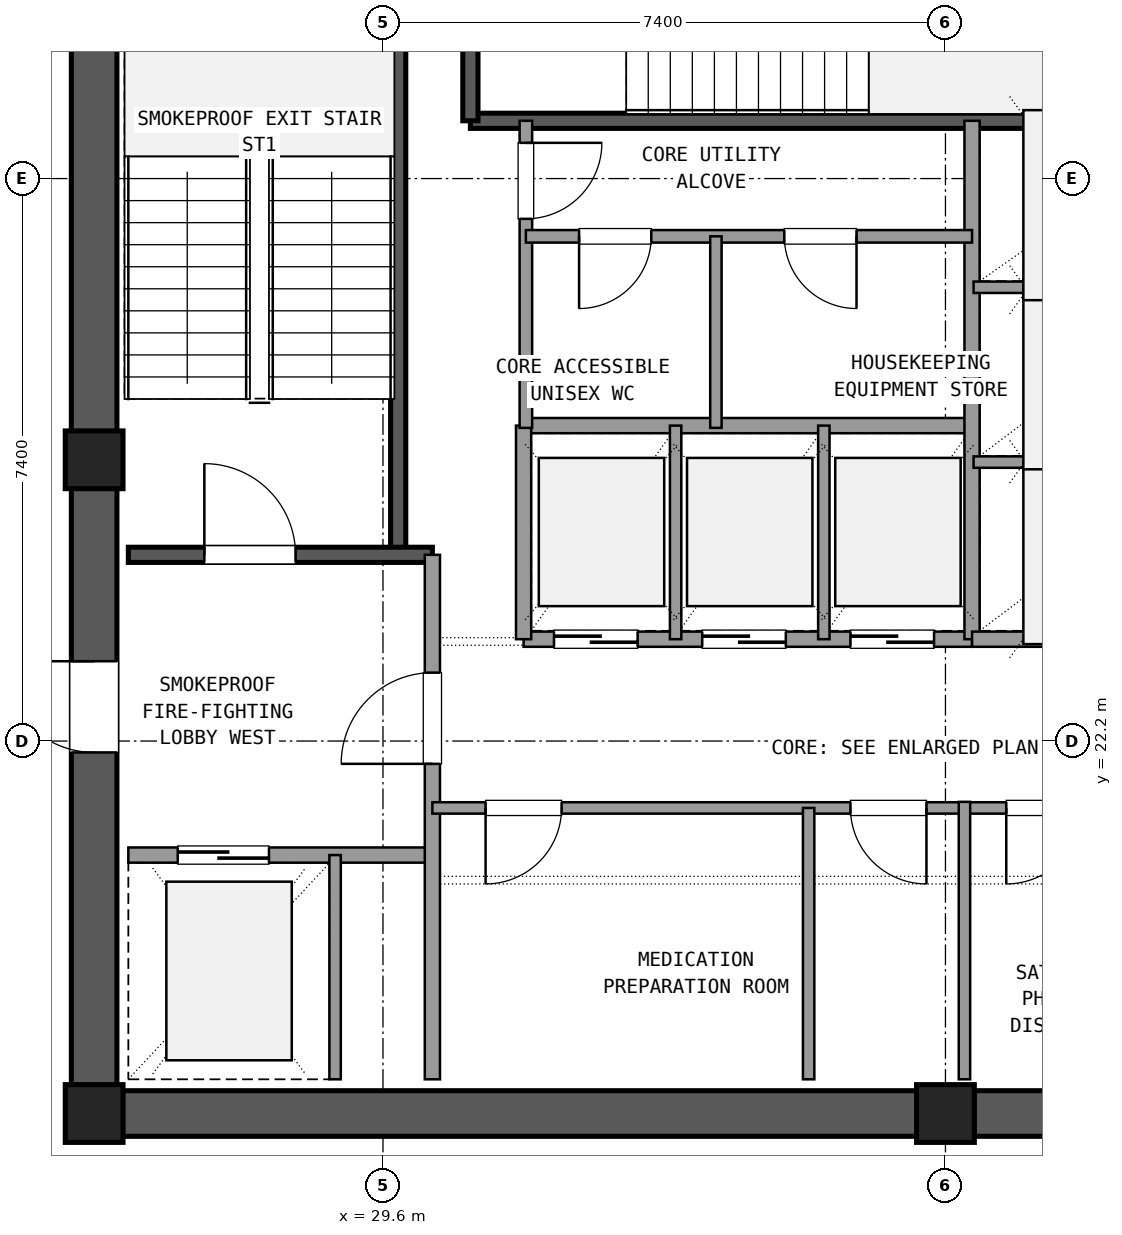
"""IFC4 building model, lengths in metres.
Left out: names, types, materials, properties, quantities, classifications, styles, units other than length and angle.
Written with IfcOpenShell. Run it as: python <this file> out.ifc"""

import sys

from ifc_helpers import new_model, si_unit, direction, frame, frame_2d, origin, origin_2d, place, context, subcontext, project, spatial, rectangle, extrude, element, fill, save


model = new_model("IFC4")
c1 = context("Model", 3, precision=1e-05, world=origin(), true_north=direction((0.0, 1.0)))
c2 = subcontext(c1, "Body", "Model", "MODEL_VIEW")
j1 = project(units=[si_unit("LENGTHUNIT", "METRE"), si_unit("PLANEANGLEUNIT", "RADIAN")], contexts=[c1])
p1 = place(None, origin())
s1 = spatial("IfcSite", under=j1, at=p1, CompositionType="ELEMENT")
p2 = place(p1, origin())
s2 = spatial("IfcBuilding", under=s1, at=p2, CompositionType="ELEMENT")
p3 = place(p2, frame((0.0, 0.0, 290.34)))
s3 = spatial("IfcBuildingStorey", under=s2, at=p3, CompositionType="ELEMENT", Elevation=290.34)
for number, where, z_axis, x_axis in (
    (1, (25.8, 17.3, 0.0), (0.0, 0.0, 1.0), (1.0, 0.0, 0.0)),
    (2, (37.0, 17.3, 0.0), (0.0, 0.0, 1.0), (1.0, 0.0, 0.0)),
    (3, (25.8, 25.9, 0.0), (0.0, 0.0, 1.0), (1.0, 0.0, 0.0)),
):
    element("IfcColumn", number, at=place(p3, frame(where, z_axis=z_axis, x_axis=x_axis)), inside=s3, PredefinedType="COLUMN", context=c2, shape_type="SweptSolid", body=[
        extrude(rectangle(XDim=0.76, YDim=0.76, at=origin_2d()), origin(), (0.0, 0.0, 1.0), 4.32),
    ])
for number, where, z_axis, x_axis in (
    (4, (26.175, 17.3, 0.0), (0.0, 0.0, 1.0), (1.0, 0.0, 0.0)),
    (5, (37.375, 17.3, 0.0), (0.0, 0.0, 1.0), (1.0, 0.0, 0.0)),
):
    element("IfcWall", number, at=place(p3, frame(where, z_axis=z_axis, x_axis=x_axis)), inside=s3, PredefinedType="SHEAR", context=c2, shape_type="SweptSolid", body=[
        extrude(rectangle(XDim=10.45, YDim=0.6, at=frame_2d((5.225, 0.0))), origin(), (0.0, 0.0, 1.0), 4.02),
    ])
p4 = place(p3, frame((25.8, 34.125, 0.0), z_axis=(0.0, 0.0, 1.0), x_axis=(0.0, -1.0, 0.0)))
e6 = element("IfcWall", 6, at=p4, inside=s3, PredefinedType="SHEAR", context=c2, shape_type="SweptSolid", body=[
    extrude(rectangle(XDim=7.85, YDim=0.6, at=frame_2d((3.925, 0.0))), origin(), (0.0, 0.0, 1.0), 4.02),
])
p5 = place(p3, frame((25.8, 25.525, 0.0), z_axis=(0.0, 0.0, 1.0), x_axis=(0.0, -1.0, 0.0)))
e7 = element("IfcWall", 7, at=p5, inside=s3, PredefinedType="SHEAR", context=c2, shape_type="SweptSolid", body=[
    extrude(rectangle(XDim=7.85, YDim=0.6, at=frame_2d((3.925, 0.0))), origin(), (0.0, 0.0, 1.0), 4.02),
])
p6 = place(p5, frame((2.275, 0.0, 0.0)))
e8 = element("IfcOpeningElement", 8, at=p6, cuts=e7, PredefinedType="OPENING", context=c2, shape_type="SweptSolid", body=[
    extrude(rectangle(XDim=1.2, YDim=2.15, at=frame_2d((0.6, 1.075))), frame((0.0, 0.31, 0.0), z_axis=(0.0, -1.0, 0.0), x_axis=(1.0, 0.0, 0.0)), (0.0, 0.0, 1.0), 0.62),
])
p7 = place(p3, frame((29.8, 24.65, 0.0), z_axis=(0.0, 0.0, 1.0), x_axis=(0.0, 1.0, 0.0)))
e9 = element("IfcWall", 9, at=p7, inside=s3, PredefinedType="SHEAR", context=c2, shape_type="SweptSolid", body=[
    extrude(rectangle(XDim=9.4, YDim=0.2, at=frame_2d((4.7, 0.0))), origin(), (0.0, 0.0, 1.0), 4.02),
])
p8 = place(p3, frame((26.25, 24.65, 0.0), z_axis=(0.0, 0.0, 1.0), x_axis=(1.0, 0.0, 0.0)))
e10 = element("IfcWall", 10, at=p8, inside=s3, PredefinedType="SHEAR", context=c2, shape_type="SweptSolid", body=[
    extrude(rectangle(XDim=4.0, YDim=0.2, at=frame_2d((2.0, 0.0))), origin(), (0.0, 0.0, 1.0), 4.02),
])
p9 = place(p8, frame((1.0, 0.0, 0.0)))
e11 = element("IfcOpeningElement", 11, at=p9, cuts=e10, PredefinedType="OPENING", context=c2, shape_type="SweptSolid", body=[
    extrude(rectangle(XDim=1.2, YDim=2.15, at=frame_2d((0.6, 1.075))), frame((0.0, 0.11, 0.0), z_axis=(0.0, -1.0, 0.0), x_axis=(1.0, 0.0, 0.0)), (0.0, 0.0, 1.0), 0.22),
])
p10 = place(p3, frame((30.75, 30.36, 0.0), z_axis=(0.0, 0.0, 1.0), x_axis=(1.0, 0.0, 0.0)))
e12 = element("IfcWall", 12, at=p10, inside=s3, PredefinedType="SHEAR", context=c2, shape_type="SweptSolid", body=[
    extrude(rectangle(XDim=9.5, YDim=0.2, at=frame_2d((4.75, 0.0))), origin(), (0.0, 0.0, 1.0), 4.02),
])
p11 = place(p3, frame((30.75, 30.36, 0.0), z_axis=(0.0, 0.0, 1.0), x_axis=(0.0, 1.0, 0.0)))
e13 = element("IfcWall", 13, at=p11, inside=s3, PredefinedType="SHEAR", context=c2, shape_type="SweptSolid", body=[
    extrude(rectangle(XDim=3.69, YDim=0.2, at=frame_2d((1.845, 0.0))), origin(), (0.0, 0.0, 1.0), 4.02),
])
p12 = place(p3, frame((26.25, 20.7, 0.0), z_axis=(0.0, 0.0, 1.0), x_axis=(1.0, 0.0, 0.0)))
e14 = element("IfcWall", 14, at=p12, inside=s3, PredefinedType="SOLIDWALL", context=c2, shape_type="SweptSolid", body=[
    extrude(rectangle(XDim=4.0, YDim=0.2, at=frame_2d((2.0, 0.0))), origin(), (0.0, 0.0, 1.0), 2.93),
])
p13 = place(p12, frame((0.65, 0.0, 0.0)))
e15 = element("IfcOpeningElement", 15, at=p13, cuts=e14, PredefinedType="OPENING", context=c2, shape_type="SweptSolid", body=[
    extrude(rectangle(XDim=1.2, YDim=2.15, at=frame_2d((0.6, 1.075))), frame((0.0, 0.11, 0.0), z_axis=(0.0, -1.0, 0.0), x_axis=(1.0, 0.0, 0.0)), (0.0, 0.0, 1.0), 0.22),
])
p14 = place(p3, frame((30.25, 17.75, 0.0), z_axis=(0.0, 0.0, 1.0), x_axis=(0.0, 1.0, 0.0)))
e16 = element("IfcWall", 16, at=p14, inside=s3, PredefinedType="SOLIDWALL", context=c2, shape_type="SweptSolid", body=[
    extrude(rectangle(XDim=6.9, YDim=0.2, at=frame_2d((3.45, 0.0))), origin(), (0.0, 0.0, 1.0), 2.93),
])
p15 = place(p14, frame((4.15, 0.0, 0.0)))
e17 = element("IfcOpeningElement", 17, at=p15, cuts=e16, PredefinedType="OPENING", context=c2, shape_type="SweptSolid", body=[
    extrude(rectangle(XDim=1.2, YDim=2.15, at=frame_2d((0.6, 1.075))), frame((0.0, 0.11, 0.0), z_axis=(0.0, -1.0, 0.0), x_axis=(1.0, 0.0, 0.0)), (0.0, 0.0, 1.0), 0.22),
])
p16 = place(p3, frame((28.97, 17.75, 0.0), z_axis=(0.0, 0.0, 1.0), x_axis=(0.0, 1.0, 0.0)))
e18 = element("IfcWall", 18, at=p16, inside=s3, PredefinedType="PARTITIONING", context=c2, shape_type="SweptSolid", body=[
    extrude(rectangle(XDim=2.95, YDim=0.15, at=frame_2d((1.475, 0.0))), origin(), (0.0, 0.0, 1.0), 2.93),
])
p17 = place(p3, frame((30.25, 21.32, 0.0), z_axis=(0.0, 0.0, 1.0), x_axis=(1.0, 0.0, 0.0)))
e19 = element("IfcWall", 19, at=p17, inside=s3, PredefinedType="PARTITIONING", context=c2, shape_type="SweptSolid", body=[
    extrude(rectangle(XDim=7.0, YDim=0.15, at=frame_2d((3.5, 0.0))), origin(), (0.0, 0.0, 1.0), 2.93),
])
p18 = place(p17, frame((0.7, 0.0, 0.0)))
e20 = element("IfcOpeningElement", 20, at=p18, cuts=e19, PredefinedType="OPENING", context=c2, shape_type="SweptSolid", body=[
    extrude(rectangle(XDim=1.0, YDim=2.15, at=frame_2d((0.5, 1.075))), frame((0.0, 0.085, 0.0), z_axis=(0.0, -1.0, 0.0), x_axis=(1.0, 0.0, 0.0)), (0.0, 0.0, 1.0), 0.17),
])
p19 = place(p17, frame((5.5, 0.0, 0.0)))
e21 = element("IfcOpeningElement", 21, at=p19, cuts=e19, PredefinedType="OPENING", context=c2, shape_type="SweptSolid", body=[
    extrude(rectangle(XDim=1.0, YDim=2.15, at=frame_2d((0.5, 1.075))), frame((0.0, 0.085, 0.0), z_axis=(0.0, -1.0, 0.0), x_axis=(1.0, 0.0, 0.0)), (0.0, 0.0, 1.0), 0.17),
])
p20 = place(p3, frame((35.2, 17.75, 0.0), z_axis=(0.0, 0.0, 1.0), x_axis=(0.0, 1.0, 0.0)))
e22 = element("IfcWall", 22, at=p20, inside=s3, PredefinedType="PARTITIONING", context=c2, shape_type="SweptSolid", body=[
    extrude(rectangle(XDim=3.57, YDim=0.15, at=frame_2d((1.785, 0.0))), origin(), (0.0, 0.0, 1.0), 2.93),
])
p21 = place(p3, frame((37.25, 21.32, 0.0), z_axis=(0.0, 0.0, 1.0), x_axis=(1.0, 0.0, 0.0)))
e23 = element("IfcWall", 23, at=p21, inside=s3, PredefinedType="PARTITIONING", context=c2, shape_type="SweptSolid", body=[
    extrude(rectangle(XDim=6.1, YDim=0.15, at=frame_2d((3.05, 0.0))), origin(), (0.0, 0.0, 1.0), 2.93),
])
p22 = place(p21, frame((0.55, 0.0, 0.0)))
e24 = element("IfcOpeningElement", 24, at=p22, cuts=e23, PredefinedType="OPENING", context=c2, shape_type="SweptSolid", body=[
    extrude(rectangle(XDim=1.0, YDim=2.15, at=frame_2d((0.5, 1.075))), frame((0.0, 0.085, 0.0), z_axis=(0.0, -1.0, 0.0), x_axis=(1.0, 0.0, 0.0)), (0.0, 0.0, 1.0), 0.17),
])
p23 = place(p21, frame((3.15, 0.0, 0.0)))
e25 = element("IfcOpeningElement", 25, at=p23, cuts=e23, PredefinedType="OPENING", context=c2, shape_type="SweptSolid", body=[
    extrude(rectangle(XDim=1.0, YDim=2.15, at=frame_2d((0.5, 1.075))), frame((0.0, 0.085, 0.0), z_axis=(0.0, -1.0, 0.0), x_axis=(1.0, 0.0, 0.0)), (0.0, 0.0, 1.0), 0.17),
])
p24 = place(p3, frame((37.25, 17.75, 0.0), z_axis=(0.0, 0.0, 1.0), x_axis=(0.0, 1.0, 0.0)))
e26 = element("IfcWall", 26, at=p24, inside=s3, PredefinedType="PARTITIONING", context=c2, shape_type="SweptSolid", body=[
    extrude(rectangle(XDim=3.65, YDim=0.15, at=frame_2d((1.825, 0.0))), origin(), (0.0, 0.0, 1.0), 2.93),
])
p25 = place(p3, frame((31.45, 23.54, 0.0), z_axis=(0.0, 0.0, 1.0), x_axis=(1.0, 0.0, 0.0)))
e27 = element("IfcWall", 27, at=p25, inside=s3, PredefinedType="SOLIDWALL", context=c2, shape_type="SweptSolid", body=[
    extrude(rectangle(XDim=5.9, YDim=0.2, at=frame_2d((2.95, 0.0))), origin(), (0.0, 0.0, 1.0), 2.93),
])
p26 = place(p25, frame((0.4, 0.0, 0.0)))
e28 = element("IfcOpeningElement", 28, at=p26, cuts=e27, PredefinedType="OPENING", context=c2, shape_type="SweptSolid", body=[
    extrude(rectangle(XDim=1.1, YDim=2.15, at=frame_2d((0.55, 1.075))), frame((0.0, 0.11, 0.0), z_axis=(0.0, -1.0, 0.0), x_axis=(1.0, 0.0, 0.0)), (0.0, 0.0, 1.0), 0.22),
])
p27 = place(p25, frame((2.35, 0.0, 0.0)))
e29 = element("IfcOpeningElement", 29, at=p27, cuts=e27, PredefinedType="OPENING", context=c2, shape_type="SweptSolid", body=[
    extrude(rectangle(XDim=1.1, YDim=2.15, at=frame_2d((0.55, 1.075))), frame((0.0, 0.11, 0.0), z_axis=(0.0, -1.0, 0.0), x_axis=(1.0, 0.0, 0.0)), (0.0, 0.0, 1.0), 0.22),
])
p28 = place(p25, frame((4.3, 0.0, 0.0)))
e30 = element("IfcOpeningElement", 30, at=p28, cuts=e27, PredefinedType="OPENING", context=c2, shape_type="SweptSolid", body=[
    extrude(rectangle(XDim=1.1, YDim=2.15, at=frame_2d((0.55, 1.075))), frame((0.0, 0.11, 0.0), z_axis=(0.0, -1.0, 0.0), x_axis=(1.0, 0.0, 0.0)), (0.0, 0.0, 1.0), 0.22),
])
p29 = place(p3, frame((31.45, 26.35, 0.0), z_axis=(0.0, 0.0, 1.0), x_axis=(1.0, 0.0, 0.0)))
e31 = element("IfcWall", 31, at=p29, inside=s3, PredefinedType="SOLIDWALL", context=c2, shape_type="SweptSolid", body=[
    extrude(rectangle(XDim=5.9, YDim=0.2, at=frame_2d((2.95, 0.0))), origin(), (0.0, 0.0, 1.0), 2.93),
])
p30 = place(p3, frame((31.45, 23.54, 0.0), z_axis=(0.0, 0.0, 1.0), x_axis=(0.0, 1.0, 0.0)))
e32 = element("IfcWall", 32, at=p30, inside=s3, PredefinedType="SOLIDWALL", context=c2, shape_type="SweptSolid", body=[
    extrude(rectangle(XDim=2.81, YDim=0.2, at=frame_2d((1.405, 0.0))), origin(), (0.0, 0.0, 1.0), 2.93),
])
for number, where, z_axis, x_axis in (
    (33, (33.45, 23.54, 0.0), (0.0, 0.0, 1.0), (0.0, 1.0, 0.0)),
    (34, (35.4, 23.54, 0.0), (0.0, 0.0, 1.0), (0.0, 1.0, 0.0)),
):
    element("IfcWall", number, at=place(p3, frame(where, z_axis=z_axis, x_axis=x_axis)), inside=s3, PredefinedType="PARTITIONING", context=c2, shape_type="SweptSolid", body=[
        extrude(rectangle(XDim=2.81, YDim=0.15, at=frame_2d((1.405, 0.0))), origin(), (0.0, 0.0, 1.0), 2.93),
    ])
p31 = place(p3, frame((37.35, 23.54, 0.0), z_axis=(0.0, 0.0, 1.0), x_axis=(0.0, 1.0, 0.0)))
e35 = element("IfcWall", 35, at=p31, inside=s3, PredefinedType="SOLIDWALL", context=c2, shape_type="SweptSolid", body=[
    extrude(rectangle(XDim=6.82, YDim=0.2, at=frame_2d((3.41, 0.0))), origin(), (0.0, 0.0, 1.0), 2.93),
])
p32 = place(p3, frame((37.35, 23.54, 0.0), z_axis=(0.0, 0.0, 1.0), x_axis=(1.0, 0.0, 0.0)))
e36 = element("IfcWall", 36, at=p32, inside=s3, PredefinedType="SOLIDWALL", context=c2, shape_type="SweptSolid", body=[
    extrude(rectangle(XDim=3.05, YDim=0.2, at=frame_2d((1.525, 0.0))), origin(), (0.0, 0.0, 1.0), 2.93),
])
for number, where, z_axis, x_axis in (
    (37, (37.37, 25.87, 0.0), (0.0, 0.0, 1.0), (1.0, 0.0, 0.0)),
    (38, (37.37, 28.17, 0.0), (0.0, 0.0, 1.0), (1.0, 0.0, 0.0)),
):
    element("IfcWall", number, at=place(p3, frame(where, z_axis=z_axis, x_axis=x_axis)), inside=s3, PredefinedType="PARTITIONING", context=c2, shape_type="SweptSolid", body=[
        extrude(rectangle(XDim=3.01, YDim=0.15, at=frame_2d((1.505, 0.0))), origin(), (0.0, 0.0, 1.0), 2.93),
    ])
p33 = place(p3, frame((31.48, 26.32, 0.0), z_axis=(0.0, 0.0, 1.0), x_axis=(0.0, 1.0, 0.0)))
e39 = element("IfcWall", 39, at=p33, inside=s3, PredefinedType="PLUMBINGWALL", context=c2, shape_type="SweptSolid", body=[
    extrude(rectangle(XDim=4.04, YDim=0.165, at=frame_2d((2.02, 0.0))), origin(), (0.0, 0.0, 1.0), 2.93),
])
p34 = place(p33, frame((2.75, 0.0, 0.0)))
e40 = element("IfcOpeningElement", 40, at=p34, cuts=e39, PredefinedType="OPENING", context=c2, shape_type="SweptSolid", body=[
    extrude(rectangle(XDim=1.0, YDim=2.15, at=frame_2d((0.5, 1.075))), frame((0.0, 0.093, 0.0), z_axis=(0.0, -1.0, 0.0), x_axis=(1.0, 0.0, 0.0)), (0.0, 0.0, 1.0), 0.185),
])
p35 = place(p3, frame((31.48, 28.84, 0.0), z_axis=(0.0, 0.0, 1.0), x_axis=(1.0, 0.0, 0.0)))
e41 = element("IfcWall", 41, at=p35, inside=s3, PredefinedType="PLUMBINGWALL", context=c2, shape_type="SweptSolid", body=[
    extrude(rectangle(XDim=5.87, YDim=0.165, at=frame_2d((2.935, 0.0))), origin(), (0.0, 0.0, 1.0), 2.93),
])
p36 = place(p35, frame((0.7, 0.0, 0.0)))
e42 = element("IfcOpeningElement", 42, at=p36, cuts=e41, PredefinedType="OPENING", context=c2, shape_type="SweptSolid", body=[
    extrude(rectangle(XDim=0.95, YDim=2.1, at=frame_2d((0.475, 1.05))), frame((0.0, 0.093, 0.0), z_axis=(0.0, -1.0, 0.0), x_axis=(1.0, 0.0, 0.0)), (0.0, 0.0, 1.0), 0.185),
])
p37 = place(p35, frame((3.4, 0.0, 0.0)))
e43 = element("IfcOpeningElement", 43, at=p37, cuts=e41, PredefinedType="OPENING", context=c2, shape_type="SweptSolid", body=[
    extrude(rectangle(XDim=0.95, YDim=2.1, at=frame_2d((0.475, 1.05))), frame((0.0, 0.093, 0.0), z_axis=(0.0, -1.0, 0.0), x_axis=(1.0, 0.0, 0.0)), (0.0, 0.0, 1.0), 0.185),
])
p38 = place(p3, frame((33.98, 26.32, 0.0), z_axis=(0.0, 0.0, 1.0), x_axis=(0.0, 1.0, 0.0)))
e44 = element("IfcWall", 44, at=p38, inside=s3, PredefinedType="PARTITIONING", context=c2, shape_type="SweptSolid", body=[
    extrude(rectangle(XDim=2.52, YDim=0.15, at=frame_2d((1.26, 0.0))), origin(), (0.0, 0.0, 1.0), 2.93),
])
p39 = place(p9, origin())
e45 = element("IfcDoor", 45, at=p39, inside=s3, OperationType="SINGLE_SWING_LEFT", PredefinedType="DOOR", context=c2, shape_type="SweptSolid", body=[
    extrude(rectangle(XDim=1.2, YDim=2.15, at=frame_2d((0.6, 1.075))), frame((0.0, 0.025, 0.0), z_axis=(0.0, -1.0, 0.0), x_axis=(1.0, 0.0, 0.0)), (0.0, 0.0, 1.0), 0.05),
])
fill(e11, e45)
p40 = place(p13, origin())
e46 = element("IfcDoor", 46, at=p40, inside=s3, OperationType="SLIDING_TO_LEFT", PredefinedType="DOOR", context=c2, shape_type="SweptSolid", body=[
    extrude(rectangle(XDim=1.2, YDim=2.15, at=frame_2d((0.6, 1.075))), frame((0.0, 0.025, 0.0), z_axis=(0.0, -1.0, 0.0), x_axis=(1.0, 0.0, 0.0)), (0.0, 0.0, 1.0), 0.05),
])
fill(e15, e46)
p41 = place(p15, origin())
e47 = element("IfcDoor", 47, at=p41, inside=s3, OperationType="SINGLE_SWING_LEFT", PredefinedType="DOOR", context=c2, shape_type="SweptSolid", body=[
    extrude(rectangle(XDim=1.2, YDim=2.15, at=frame_2d((0.6, 1.075))), frame((0.0, 0.025, 0.0), z_axis=(0.0, -1.0, 0.0), x_axis=(1.0, 0.0, 0.0)), (0.0, 0.0, 1.0), 0.05),
])
fill(e17, e47)
p42 = place(p6, frame((1.2, 0.0, 0.0), z_axis=(0.0, 0.0, 1.0), x_axis=(-1.0, 0.0, 0.0)))
e48 = element("IfcDoor", 48, at=p42, inside=s3, OperationType="SINGLE_SWING_LEFT", PredefinedType="DOOR", context=c2, shape_type="SweptSolid", body=[
    extrude(rectangle(XDim=1.2, YDim=2.15, at=frame_2d((0.6, 1.075))), frame((0.0, 0.025, 0.0), z_axis=(0.0, -1.0, 0.0), x_axis=(1.0, 0.0, 0.0)), (0.0, 0.0, 1.0), 0.05),
])
fill(e8, e48)
p43 = place(p18, frame((1.0, 0.0, 0.0), z_axis=(0.0, 0.0, 1.0), x_axis=(-1.0, 0.0, 0.0)))
e49 = element("IfcDoor", 49, at=p43, inside=s3, OperationType="SINGLE_SWING_LEFT", PredefinedType="DOOR", context=c2, shape_type="SweptSolid", body=[
    extrude(rectangle(XDim=1.0, YDim=2.15, at=frame_2d((0.5, 1.075))), frame((0.0, 0.025, 0.0), z_axis=(0.0, -1.0, 0.0), x_axis=(1.0, 0.0, 0.0)), (0.0, 0.0, 1.0), 0.05),
])
fill(e20, e49)
p44 = place(p19, frame((1.0, 0.0, 0.0), z_axis=(0.0, 0.0, 1.0), x_axis=(-1.0, 0.0, 0.0)))
e50 = element("IfcDoor", 50, at=p44, inside=s3, OperationType="SINGLE_SWING_RIGHT", PredefinedType="DOOR", context=c2, shape_type="SweptSolid", body=[
    extrude(rectangle(XDim=1.0, YDim=2.15, at=frame_2d((0.5, 1.075))), frame((0.0, 0.025, 0.0), z_axis=(0.0, -1.0, 0.0), x_axis=(1.0, 0.0, 0.0)), (0.0, 0.0, 1.0), 0.05),
])
fill(e21, e50)
p45 = place(p22, frame((1.0, 0.0, 0.0), z_axis=(0.0, 0.0, 1.0), x_axis=(-1.0, 0.0, 0.0)))
e51 = element("IfcDoor", 51, at=p45, inside=s3, OperationType="SINGLE_SWING_LEFT", PredefinedType="DOOR", context=c2, shape_type="SweptSolid", body=[
    extrude(rectangle(XDim=1.0, YDim=2.15, at=frame_2d((0.5, 1.075))), frame((0.0, 0.025, 0.0), z_axis=(0.0, -1.0, 0.0), x_axis=(1.0, 0.0, 0.0)), (0.0, 0.0, 1.0), 0.05),
])
fill(e24, e51)
p46 = place(p26, origin())
e52 = element("IfcDoor", 52, at=p46, inside=s3, OperationType="SLIDING_TO_RIGHT", PredefinedType="DOOR", context=c2, shape_type="SweptSolid", body=[
    extrude(rectangle(XDim=1.1, YDim=2.15, at=frame_2d((0.55, 1.075))), frame((0.0, 0.025, 0.0), z_axis=(0.0, -1.0, 0.0), x_axis=(1.0, 0.0, 0.0)), (0.0, 0.0, 1.0), 0.05),
])
fill(e28, e52)
p47 = place(p27, origin())
e53 = element("IfcDoor", 53, at=p47, inside=s3, OperationType="SLIDING_TO_RIGHT", PredefinedType="DOOR", context=c2, shape_type="SweptSolid", body=[
    extrude(rectangle(XDim=1.1, YDim=2.15, at=frame_2d((0.55, 1.075))), frame((0.0, 0.025, 0.0), z_axis=(0.0, -1.0, 0.0), x_axis=(1.0, 0.0, 0.0)), (0.0, 0.0, 1.0), 0.05),
])
fill(e29, e53)
p48 = place(p28, origin())
e54 = element("IfcDoor", 54, at=p48, inside=s3, OperationType="SLIDING_TO_RIGHT", PredefinedType="DOOR", context=c2, shape_type="SweptSolid", body=[
    extrude(rectangle(XDim=1.1, YDim=2.15, at=frame_2d((0.55, 1.075))), frame((0.0, 0.025, 0.0), z_axis=(0.0, -1.0, 0.0), x_axis=(1.0, 0.0, 0.0)), (0.0, 0.0, 1.0), 0.05),
])
fill(e30, e54)
p49 = place(p34, frame((1.0, 0.0, 0.0), z_axis=(0.0, 0.0, 1.0), x_axis=(-1.0, 0.0, 0.0)))
e55 = element("IfcDoor", 55, at=p49, inside=s3, OperationType="SINGLE_SWING_RIGHT", PredefinedType="DOOR", context=c2, shape_type="SweptSolid", body=[
    extrude(rectangle(XDim=1.0, YDim=2.15, at=frame_2d((0.5, 1.075))), frame((0.0, 0.025, 0.0), z_axis=(0.0, -1.0, 0.0), x_axis=(1.0, 0.0, 0.0)), (0.0, 0.0, 1.0), 0.05),
])
fill(e40, e55)
p50 = place(p36, frame((0.95, 0.0, 0.0), z_axis=(0.0, 0.0, 1.0), x_axis=(-1.0, 0.0, 0.0)))
e56 = element("IfcDoor", 56, at=p50, inside=s3, OperationType="SINGLE_SWING_LEFT", PredefinedType="DOOR", context=c2, shape_type="SweptSolid", body=[
    extrude(rectangle(XDim=0.95, YDim=2.1, at=frame_2d((0.475, 1.05))), frame((0.0, 0.025, 0.0), z_axis=(0.0, -1.0, 0.0), x_axis=(1.0, 0.0, 0.0)), (0.0, 0.0, 1.0), 0.05),
])
fill(e42, e56)
p51 = place(p37, frame((0.95, 0.0, 0.0), z_axis=(0.0, 0.0, 1.0), x_axis=(-1.0, 0.0, 0.0)))
e57 = element("IfcDoor", 57, at=p51, inside=s3, OperationType="SINGLE_SWING_RIGHT", PredefinedType="DOOR", context=c2, shape_type="SweptSolid", body=[
    extrude(rectangle(XDim=0.95, YDim=2.1, at=frame_2d((0.475, 1.05))), frame((0.0, 0.025, 0.0), z_axis=(0.0, -1.0, 0.0), x_axis=(1.0, 0.0, 0.0)), (0.0, 0.0, 1.0), 0.05),
])
fill(e43, e57)
save(model, sys.argv[1])
